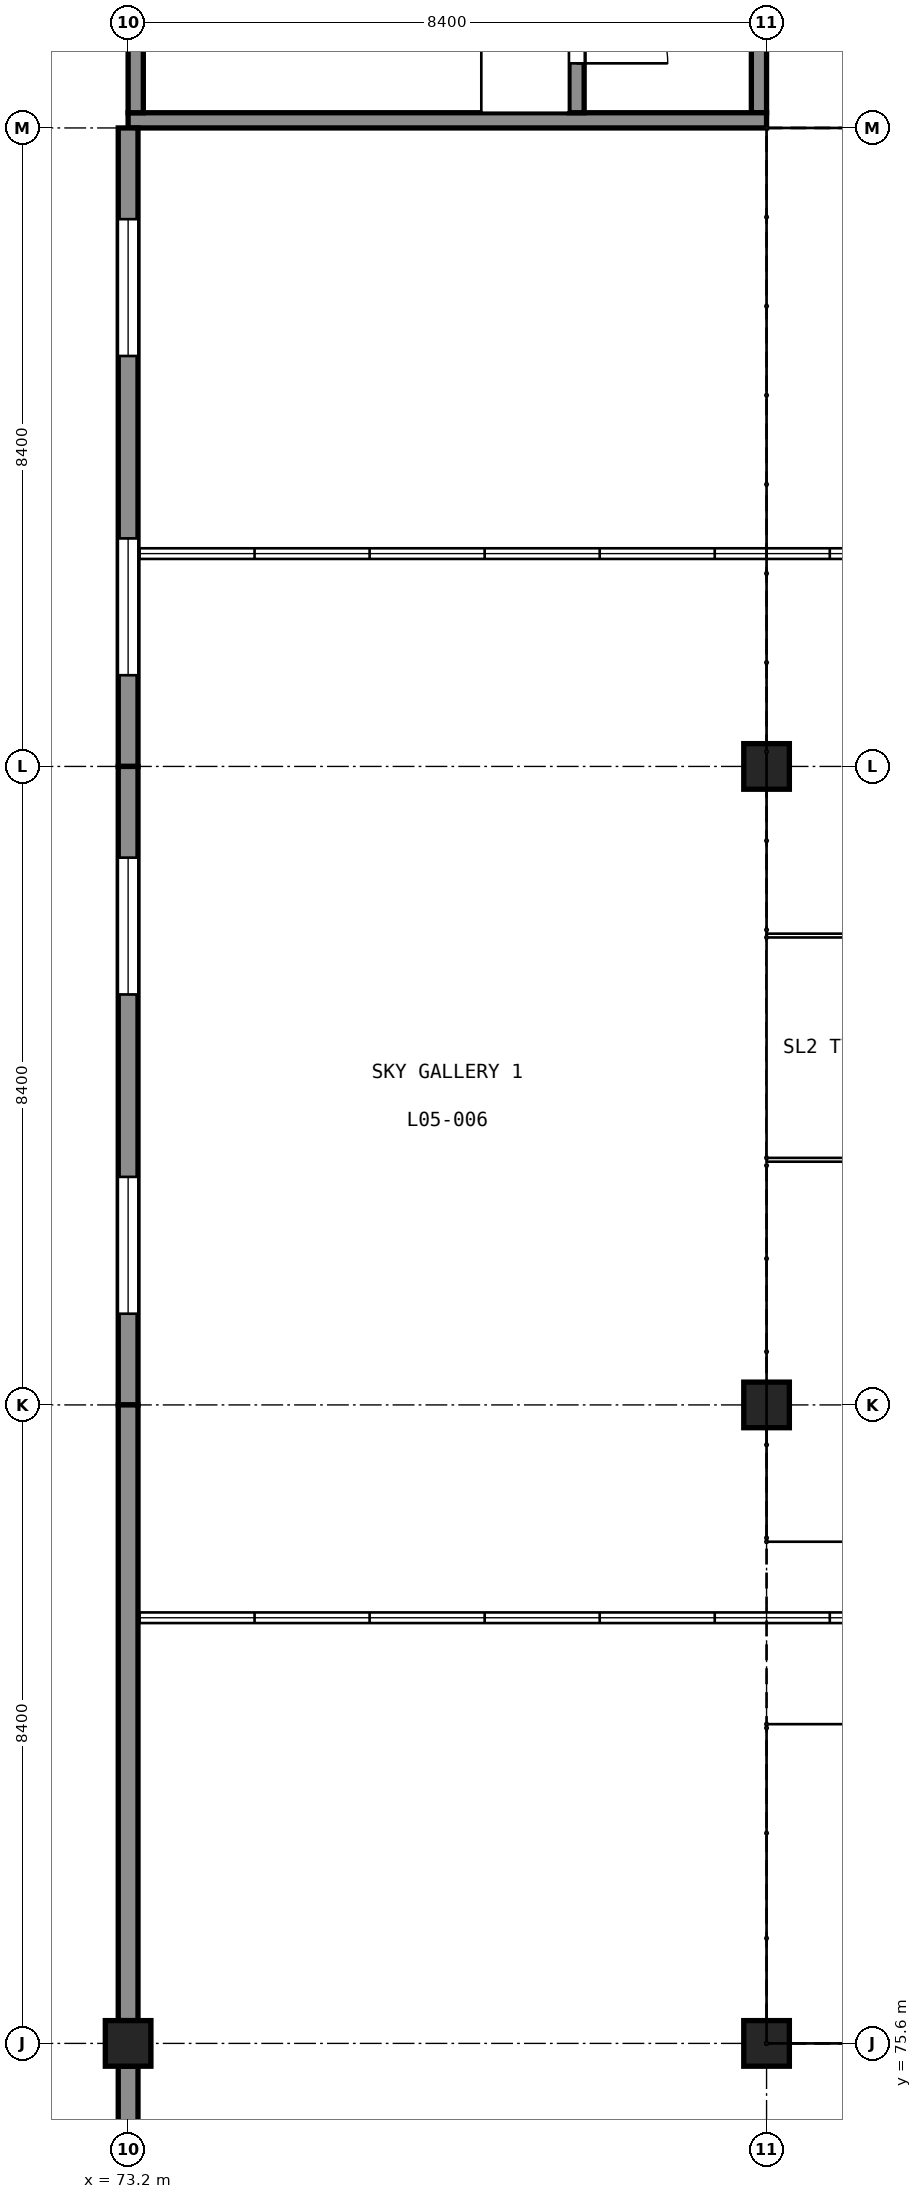
"""IFC4 building model, lengths in metres.
Left out: names, types, materials, properties, quantities, classifications, styles, units other than length and angle.
Written with IfcOpenShell. Run it as: python <this file> out.ifc"""

import sys

from ifc_helpers import new_model, si_unit, direction, frame, frame_2d, origin, origin_2d, place, context, subcontext, project, spatial, polyline, rectangle, outline, extrude, element, fill, save


model = new_model("IFC4")
c1 = context("Model", 3, precision=1e-05, world=origin(), true_north=direction((0.0, 1.0)))
c2 = subcontext(c1, "Body", "Model", "MODEL_VIEW")
j1 = project(units=[si_unit("LENGTHUNIT", "METRE"), si_unit("PLANEANGLEUNIT", "RADIAN")], contexts=[c1])
p1 = place(None, origin())
s1 = spatial("IfcSite", under=j1, at=p1, CompositionType="ELEMENT")
p2 = place(p1, origin())
s2 = spatial("IfcBuilding", under=s1, at=p2, CompositionType="ELEMENT")
p3 = place(p2, frame((0.0, 0.0, 30.0)))
s3 = spatial("IfcBuildingStorey", under=s2, at=p3, CompositionType="ELEMENT", Elevation=30.0)
p4 = place(p3, frame((73.2, 100.9, 0.0), z_axis=(0.0, 0.0, 1.0), x_axis=(1.0, 0.0, 0.0)))
e1 = element("IfcWall", 1, at=p4, inside=s3, PredefinedType="SHEAR", context=c2, shape_type="SweptSolid", body=[
    extrude(rectangle(XDim=8.4, YDim=0.2, at=frame_2d((4.2, 0.0))), origin(), (0.0, 0.0, 1.0), 12.38),
])
p5 = place(p3, frame((73.3, 101.0, 0.0), z_axis=(0.0, 0.0, 1.0), x_axis=(0.0, 1.0, 0.0)))
e2 = element("IfcWall", 2, at=p5, inside=s3, PredefinedType="SHEAR", context=c2, shape_type="SweptSolid", body=[
    extrude(rectangle(XDim=8.0, YDim=0.2, at=frame_2d((4.0, 0.0))), origin(), (0.0, 0.0, 1.0), 12.38),
])
p6 = place(p3, frame((81.5, 101.0, 0.0), z_axis=(0.0, 0.0, 1.0), x_axis=(0.0, 1.0, 0.0)))
e3 = element("IfcWall", 3, at=p6, inside=s3, PredefinedType="SHEAR", context=c2, shape_type="SweptSolid", body=[
    extrude(rectangle(XDim=8.0, YDim=0.2, at=frame_2d((4.0, 0.0))), origin(), (0.0, 0.0, 1.0), 12.38),
])
p7 = place(p6, frame((3.1, 0.0, 0.0)))
e4 = element("IfcOpeningElement", 4, at=p7, cuts=e3, PredefinedType="OPENING", context=c2, shape_type="SweptSolid", body=[
    extrude(rectangle(XDim=1.8, YDim=2.1, at=frame_2d((0.9, 1.05))), frame((0.0, 0.11, 0.0), z_axis=(0.0, -1.0, 0.0), x_axis=(1.0, 0.0, 0.0)), (0.0, 0.0, 1.0), 0.22),
])
p8 = place(p3, frame((79.1, 101.0, 0.0), z_axis=(0.0, 0.0, 1.0), x_axis=(0.0, 1.0, 0.0)))
e5 = element("IfcWall", 5, at=p8, inside=s3, PredefinedType="SHEAR", context=c2, shape_type="SweptSolid", body=[
    extrude(rectangle(XDim=8.0, YDim=0.2, at=frame_2d((4.0, 0.0))), origin(), (0.0, 0.0, 1.0), 12.38),
])
p9 = place(p8, frame((0.65, 0.0, 0.0)))
e6 = element("IfcOpeningElement", 6, at=p9, cuts=e5, PredefinedType="OPENING", context=c2, shape_type="SweptSolid", body=[
    extrude(rectangle(XDim=1.2, YDim=2.1, at=frame_2d((0.6, 1.05))), frame((0.0, 0.11, 0.0), z_axis=(0.0, -1.0, 0.0), x_axis=(1.0, 0.0, 0.0)), (0.0, 0.0, 1.0), 0.22),
])
p10 = place(p8, frame((6.15, 0.0, 0.0)))
e7 = element("IfcOpeningElement", 7, at=p10, cuts=e5, PredefinedType="OPENING", context=c2, shape_type="SweptSolid", body=[
    extrude(rectangle(XDim=1.2, YDim=2.1, at=frame_2d((0.6, 1.05))), frame((0.0, 0.11, 0.0), z_axis=(0.0, -1.0, 0.0), x_axis=(1.0, 0.0, 0.0)), (0.0, 0.0, 1.0), 0.22),
])
p11 = place(p8, frame((3.45, 0.0, 0.0)))
e8 = element("IfcOpeningElement", 8, at=p11, cuts=e5, PredefinedType="OPENING", context=c2, shape_type="SweptSolid", body=[
    extrude(rectangle(XDim=1.1, YDim=2.1, at=frame_2d((0.55, 1.05))), frame((0.0, 0.11, 0.0), z_axis=(0.0, -1.0, 0.0), x_axis=(1.0, 0.0, 0.0)), (0.0, 0.0, 1.0), 0.22),
])
for number, where, z_axis, x_axis in (
    (9, (73.2, 75.6, 0.0), (0.0, 0.0, 1.0), (1.0, 0.0, 0.0)),
    (10, (81.6, 75.6, 0.0), (0.0, 0.0, 1.0), (1.0, 0.0, 0.0)),
):
    element("IfcColumn", number, at=place(p3, frame(where, z_axis=z_axis, x_axis=x_axis)), inside=s3, PredefinedType="COLUMN", context=c2, shape_type="SweptSolid", body=[
        extrude(rectangle(XDim=0.6, YDim=0.6, at=origin_2d()), origin(), (0.0, 0.0, 1.0), 3.653),
    ])
p12 = place(p3, frame((81.6, 84.0, 0.0), z_axis=(0.0, 0.0, 1.0), x_axis=(1.0, 0.0, 0.0)))
e11 = element("IfcColumn", 11, at=p12, inside=s3, PredefinedType="COLUMN", context=c2, shape_type="SweptSolid", body=[
    extrude(rectangle(XDim=0.6, YDim=0.6, at=origin_2d()), origin(), (0.0, 0.0, 1.0), 4.133),
])
p13 = place(p3, frame((81.6, 92.4, 0.0), z_axis=(0.0, 0.0, 1.0), x_axis=(1.0, 0.0, 0.0)))
e12 = element("IfcColumn", 12, at=p13, inside=s3, PredefinedType="COLUMN", context=c2, shape_type="SweptSolid", body=[
    extrude(rectangle(XDim=0.6, YDim=0.6, at=origin_2d()), origin(), (0.0, 0.0, 1.0), 4.613),
])
p14 = place(p3, frame((73.2, 92.4, 0.0), z_axis=(0.0, 0.0, 1.0), x_axis=(0.0, 1.0, 0.0)))
e13 = element("IfcWall", 13, at=p14, inside=s3, PredefinedType="SOLIDWALL", context=c2, shape_type="SweptSolid", body=[
    extrude(outline(polyline([(0.0, 0.0), (8.4, 0.0), (8.4, 4.603), (2.801, 3.938), (2.799, 4.603), (0.0, 4.603), (0.0, 0.0)])), frame((0.0, 0.13, 0.0), z_axis=(0.0, -1.0, 0.0), x_axis=(1.0, 0.0, 0.0)), (0.0, 0.0, 1.0), 0.26),
])
p15 = place(p14, frame((1.2, 0.0, 0.9)))
e14 = element("IfcOpeningElement", 14, at=p15, cuts=e13, PredefinedType="OPENING", context=c2, shape_type="SweptSolid", body=[
    extrude(rectangle(XDim=1.8, YDim=2.7, at=frame_2d((0.9, 1.35))), frame((0.0, 0.14, 0.0), z_axis=(0.0, -1.0, 0.0), x_axis=(1.0, 0.0, 0.0)), (0.0, 0.0, 1.0), 0.28),
])
p16 = place(p14, frame((5.4, 0.0, 0.9)))
e15 = element("IfcOpeningElement", 15, at=p16, cuts=e13, PredefinedType="OPENING", context=c2, shape_type="SweptSolid", body=[
    extrude(rectangle(XDim=1.8, YDim=2.7, at=frame_2d((0.9, 1.35))), frame((0.0, 0.14, 0.0), z_axis=(0.0, -1.0, 0.0), x_axis=(1.0, 0.0, 0.0)), (0.0, 0.0, 1.0), 0.28),
])
p17 = place(p3, frame((73.2, 84.0, 0.4), z_axis=(0.0, 0.0, 1.0), x_axis=(0.0, 1.0, 0.0)))
e16 = element("IfcWall", 16, at=p17, inside=s3, PredefinedType="SOLIDWALL", context=c2, shape_type="SweptSolid", body=[
    extrude(outline(polyline([(0.0, 0.0), (8.4, 0.0), (8.4, 3.723), (0.0, 3.723), (0.0, 0.0)])), frame((0.0, 0.13, 0.0), z_axis=(0.0, -1.0, 0.0), x_axis=(1.0, 0.0, 0.0)), (0.0, 0.0, 1.0), 0.26),
])
p18 = place(p17, frame((1.2, 0.0, 0.9)))
e17 = element("IfcOpeningElement", 17, at=p18, cuts=e16, PredefinedType="OPENING", context=c2, shape_type="SweptSolid", body=[
    extrude(rectangle(XDim=1.8, YDim=2.7, at=frame_2d((0.9, 1.35))), frame((0.0, 0.14, 0.0), z_axis=(0.0, -1.0, 0.0), x_axis=(1.0, 0.0, 0.0)), (0.0, 0.0, 1.0), 0.28),
])
p19 = place(p17, frame((5.4, 0.0, 0.9)))
e18 = element("IfcOpeningElement", 18, at=p19, cuts=e16, PredefinedType="OPENING", context=c2, shape_type="SweptSolid", body=[
    extrude(rectangle(XDim=1.8, YDim=2.7, at=frame_2d((0.9, 1.35))), frame((0.0, 0.14, 0.0), z_axis=(0.0, -1.0, 0.0), x_axis=(1.0, 0.0, 0.0)), (0.0, 0.0, 1.0), 0.28),
])
p20 = place(p3, frame((73.2, 75.9, 0.0), z_axis=(0.0, 0.0, 1.0), x_axis=(0.0, 1.0, 0.0)))
e19 = element("IfcWall", 19, at=p20, inside=s3, PredefinedType="SOLIDWALL", context=c2, shape_type="SweptSolid", body=[
    extrude(outline(polyline([(0.0, 0.0), (8.1, 0.0), (8.1, 3.643), (5.301, 3.137), (5.299, 3.643), (0.0, 3.643), (0.0, 0.0)])), frame((0.0, 0.13, 0.0), z_axis=(0.0, -1.0, 0.0), x_axis=(1.0, 0.0, 0.0)), (0.0, 0.0, 1.0), 0.26),
])
p21 = place(p3, frame((73.2, 67.5, 0.0), z_axis=(0.0, 0.0, 1.0), x_axis=(0.0, 1.0, 0.0)))
e20 = element("IfcWall", 20, at=p21, inside=s3, PredefinedType="SOLIDWALL", context=c2, shape_type="SweptSolid", body=[
    extrude(outline(polyline([(0.0, 0.0), (7.8, 0.0), (7.8, 6.64), (0.0, 4.332), (0.0, 0.0)])), frame((0.0, 0.13, 0.0), z_axis=(0.0, -1.0, 0.0), x_axis=(1.0, 0.0, 0.0)), (0.0, 0.0, 1.0), 0.26),
])
p22 = place(p21, frame((0.9, 0.0, 0.9)))
e21 = element("IfcOpeningElement", 21, at=p22, cuts=e20, PredefinedType="OPENING", context=c2, shape_type="SweptSolid", body=[
    extrude(rectangle(XDim=1.8, YDim=2.7, at=frame_2d((0.9, 1.35))), frame((0.0, 0.14, 0.0), z_axis=(0.0, -1.0, 0.0), x_axis=(1.0, 0.0, 0.0)), (0.0, 0.0, 1.0), 0.28),
])
p23 = place(p21, frame((5.1, 0.0, 0.9)))
e22 = element("IfcOpeningElement", 22, at=p23, cuts=e20, PredefinedType="OPENING", context=c2, shape_type="SweptSolid", body=[
    extrude(rectangle(XDim=1.8, YDim=2.7, at=frame_2d((0.9, 1.35))), frame((0.0, 0.14, 0.0), z_axis=(0.0, -1.0, 0.0), x_axis=(1.0, 0.0, 0.0)), (0.0, 0.0, 1.0), 0.28),
])
p24 = place(p15, origin())
e23 = element("IfcWindow", 23, at=p24, inside=s3, PartitioningType="SINGLE_PANEL", PredefinedType="WINDOW", context=c2, shape_type="SweptSolid", body=[
    extrude(rectangle(XDim=1.8, YDim=2.7, at=frame_2d((0.9, 1.35))), frame((0.0, -0.05, 0.0), z_axis=(0.0, -1.0, 0.0), x_axis=(1.0, 0.0, 0.0)), (0.0, 0.0, 1.0), 0.06),
])
fill(e14, e23)
p25 = place(p16, origin())
e24 = element("IfcWindow", 24, at=p25, inside=s3, PartitioningType="SINGLE_PANEL", PredefinedType="WINDOW", context=c2, shape_type="SweptSolid", body=[
    extrude(rectangle(XDim=1.8, YDim=2.7, at=frame_2d((0.9, 1.35))), frame((0.0, -0.05, 0.0), z_axis=(0.0, -1.0, 0.0), x_axis=(1.0, 0.0, 0.0)), (0.0, 0.0, 1.0), 0.06),
])
fill(e15, e24)
p26 = place(p18, origin())
e25 = element("IfcWindow", 25, at=p26, inside=s3, PartitioningType="SINGLE_PANEL", PredefinedType="WINDOW", context=c2, shape_type="SweptSolid", body=[
    extrude(rectangle(XDim=1.8, YDim=2.7, at=frame_2d((0.9, 1.35))), frame((0.0, -0.05, 0.0), z_axis=(0.0, -1.0, 0.0), x_axis=(1.0, 0.0, 0.0)), (0.0, 0.0, 1.0), 0.06),
])
fill(e17, e25)
p27 = place(p19, origin())
e26 = element("IfcWindow", 26, at=p27, inside=s3, PartitioningType="SINGLE_PANEL", PredefinedType="WINDOW", context=c2, shape_type="SweptSolid", body=[
    extrude(rectangle(XDim=1.8, YDim=2.7, at=frame_2d((0.9, 1.35))), frame((0.0, -0.05, 0.0), z_axis=(0.0, -1.0, 0.0), x_axis=(1.0, 0.0, 0.0)), (0.0, 0.0, 1.0), 0.06),
])
fill(e18, e26)
p28 = place(p3, frame((73.2, 67.2, 5.0), z_axis=(5.49644e-07, -0.292373342907, 0.956304255118), x_axis=(-1e-12, 0.956304255118, 0.292373342907)))
p29 = place(p28, frame((7.32, -5.8, 0.01), z_axis=(0.0, 0.0, -1.0), x_axis=(1.797794e-06, -0.999999999998, 0.0)))
p30 = place(p29, frame((0.0, 0.0, 0.01)))
e27 = element("IfcWindow", 27, at=p30, inside=s3, PartitioningType="SINGLE_PANEL", PredefinedType="SKYLIGHT", context=c2, shape_type="SweptSolid", body=[
    extrude(rectangle(XDim=1.0, YDim=1.4, at=origin_2d()), origin(), (0.0, 0.0, 1.0), 0.05),
])
p31 = place(p3, frame((73.2, 81.2, 5.8), z_axis=(0.0, -0.292374446903, 0.95630391759), x_axis=(1.0, 0.0, 0.0)))
p32 = place(p31, frame((5.8, 7.32, 0.01), z_axis=(0.0, 0.0, -1.0), x_axis=(1.0, 0.0, 0.0)))
p33 = place(p32, frame((0.0, 0.0, 0.01)))
e28 = element("IfcWindow", 28, at=p33, inside=s3, PartitioningType="SINGLE_PANEL", PredefinedType="SKYLIGHT", context=c2, shape_type="SweptSolid", body=[
    extrude(rectangle(XDim=1.0, YDim=1.4, at=origin_2d()), origin(), (0.0, 0.0, 1.0), 0.05),
])
p34 = place(p9, origin())
e29 = element("IfcDoor", 29, at=p34, inside=s3, OperationType="SINGLE_SWING_LEFT", PredefinedType="DOOR", context=c2, shape_type="SweptSolid", body=[
    extrude(rectangle(XDim=1.2, YDim=2.1, at=frame_2d((0.6, 1.05))), frame((0.0, 0.025, 0.0), z_axis=(0.0, -1.0, 0.0), x_axis=(1.0, 0.0, 0.0)), (0.0, 0.0, 1.0), 0.05),
])
fill(e6, e29)
save(model, sys.argv[1])
